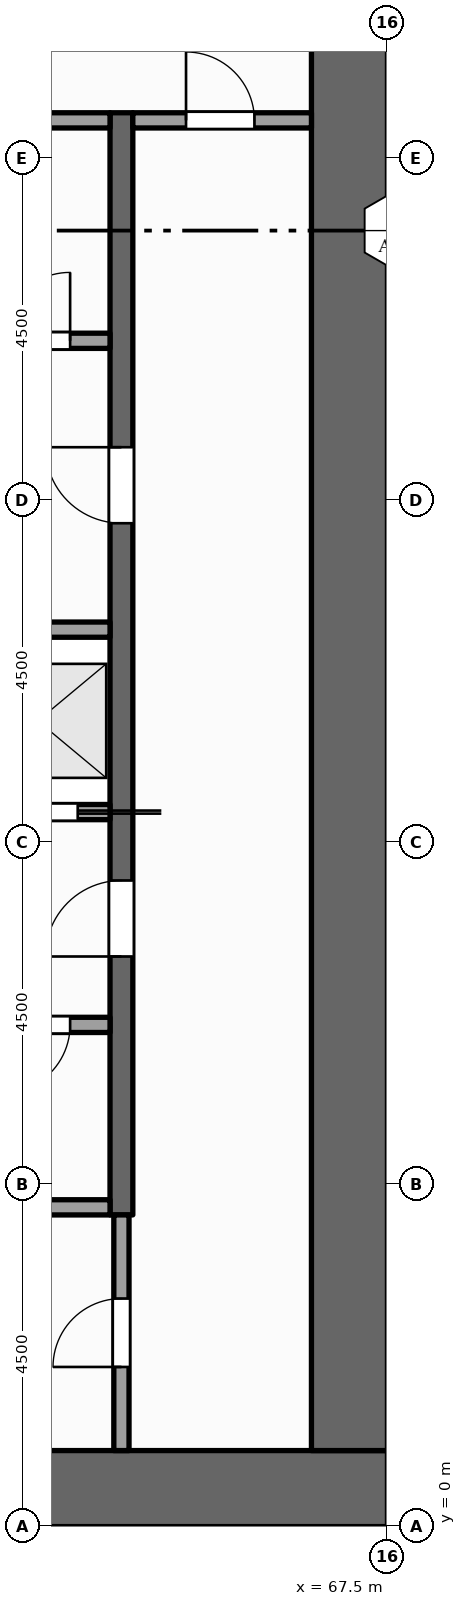
"""IFC4 building model, lengths in metres.
Left out: names, types, materials, properties, quantities, classifications, styles, units other than length and angle.
Written with IfcOpenShell. Run it as: python <this file> out.ifc"""

import sys

from ifc_helpers import new_model, si_unit, direction, frame, frame_2d, origin, place, context, subcontext, project, spatial, rectangle, extrude, element, fill, save


model = new_model("IFC4")
c1 = context("Model", 3, precision=1e-05, world=origin(), true_north=direction((0.0, 1.0)))
c2 = subcontext(c1, "Body", "Model", "MODEL_VIEW")
j1 = project(units=[si_unit("LENGTHUNIT", "METRE"), si_unit("PLANEANGLEUNIT", "RADIAN")], contexts=[c1])
p1 = place(None, origin())
s1 = spatial("IfcSite", under=j1, at=p1, CompositionType="ELEMENT")
p2 = place(p1, origin())
s2 = spatial("IfcBuilding", under=s1, at=p2, CompositionType="ELEMENT")
p3 = place(p2, frame((0.0, 0.0, 215.0)))
s3 = spatial("IfcBuildingStorey", under=s2, at=p3, CompositionType="ELEMENT", Elevation=215.0)
p4 = place(p3, frame((67.5, 0.5, -0.15), z_axis=(0.0, 0.0, 1.0), x_axis=(-1.0, 0.0, 0.0)))
e1 = element("IfcWall", 1, at=p4, inside=s3, PredefinedType="SHEAR", context=c2, shape_type="SweptSolid", body=[
    extrude(rectangle(XDim=13.5, YDim=1.0, at=frame_2d((6.75, 0.0))), origin(), (0.0, 0.0, 1.0), 4.0),
])
p5 = place(p3, frame((67.0, 1.0, -0.15), z_axis=(0.0, 0.0, 1.0), x_axis=(0.0, 1.0, 0.0)))
e2 = element("IfcWall", 2, at=p5, inside=s3, PredefinedType="SHEAR", context=c2, shape_type="SweptSolid", body=[
    extrude(rectangle(XDim=20.5, YDim=1.0, at=frame_2d((10.25, 0.0))), origin(), (0.0, 0.0, 1.0), 4.0),
])
p6 = place(p3, frame((64.0, 1.0, 0.0), z_axis=(0.0, 0.0, 1.0), x_axis=(0.0, 1.0, 0.0)))
e3 = element("IfcWall", 3, at=p6, inside=s3, PredefinedType="PARTITIONING", context=c2, shape_type="SweptSolid", body=[
    extrude(rectangle(XDim=3.1, YDim=0.2, at=frame_2d((1.55, 0.0))), origin(), (0.0, 0.0, 1.0), 3.85),
])
p7 = place(p6, frame((1.1, 0.0, 0.0)))
e4 = element("IfcOpeningElement", 4, at=p7, cuts=e3, PredefinedType="OPENING", context=c2, shape_type="SweptSolid", body=[
    extrude(rectangle(XDim=0.9, YDim=2.1, at=frame_2d((0.45, 1.05))), frame((0.0, 0.11, 0.0), z_axis=(0.0, -1.0, 0.0), x_axis=(1.0, 0.0, 0.0)), (0.0, 0.0, 1.0), 0.22),
])
p8 = place(p3, frame((64.0, 4.1, 0.0), z_axis=(0.0, 0.0, 1.0), x_axis=(0.0, 1.0, 0.0)))
e5 = element("IfcWall", 5, at=p8, inside=s3, PredefinedType="SHEAR", context=c2, shape_type="SweptSolid", body=[
    extrude(rectangle(XDim=14.5, YDim=0.3, at=frame_2d((7.25, 0.0))), origin(), (0.0, 0.0, 1.0), 3.85),
])
p9 = place(p8, frame((3.4, 0.0, 0.0)))
e6 = element("IfcOpeningElement", 6, at=p9, cuts=e5, PredefinedType="OPENING", context=c2, shape_type="SweptSolid", body=[
    extrude(rectangle(XDim=1.0, YDim=2.1, at=frame_2d((0.5, 1.05))), frame((0.0, 0.16, 0.0), z_axis=(0.0, -1.0, 0.0), x_axis=(1.0, 0.0, 0.0)), (0.0, 0.0, 1.0), 0.32),
])
p10 = place(p8, frame((9.1, 0.0, 0.0)))
e7 = element("IfcOpeningElement", 7, at=p10, cuts=e5, PredefinedType="OPENING", context=c2, shape_type="SweptSolid", body=[
    extrude(rectangle(XDim=1.0, YDim=2.1, at=frame_2d((0.5, 1.05))), frame((0.0, 0.16, 0.0), z_axis=(0.0, -1.0, 0.0), x_axis=(1.0, 0.0, 0.0)), (0.0, 0.0, 1.0), 0.32),
])
p11 = place(p3, frame((61.9, 4.2, 0.0), z_axis=(0.0, 0.0, 1.0), x_axis=(1.0, 0.0, 0.0)))
e8 = element("IfcWall", 8, at=p11, inside=s3, PredefinedType="PARTITIONING", context=c2, shape_type="SweptSolid", body=[
    extrude(rectangle(XDim=1.95, YDim=0.2, at=frame_2d((0.975, 0.0))), origin(), (0.0, 0.0, 1.0), 3.85),
])
p12 = place(p3, frame((61.9, 6.6, 0.0), z_axis=(0.0, 0.0, 1.0), x_axis=(1.0, 0.0, 0.0)))
e9 = element("IfcWall", 9, at=p12, inside=s3, PredefinedType="PARTITIONING", context=c2, shape_type="SweptSolid", body=[
    extrude(rectangle(XDim=1.95, YDim=0.2, at=frame_2d((0.975, 0.0))), origin(), (0.0, 0.0, 1.0), 3.85),
])
p13 = place(p12, frame((0.525, 0.0, 0.0)))
e10 = element("IfcOpeningElement", 10, at=p13, cuts=e9, PredefinedType="OPENING", context=c2, shape_type="SweptSolid", body=[
    extrude(rectangle(XDim=0.9, YDim=2.1, at=frame_2d((0.45, 1.05))), frame((0.0, 0.11, 0.0), z_axis=(0.0, -1.0, 0.0), x_axis=(1.0, 0.0, 0.0)), (0.0, 0.0, 1.0), 0.22),
])
p14 = place(p3, frame((61.9, 9.4, 0.0), z_axis=(0.0, 0.0, 1.0), x_axis=(1.0, 0.0, 0.0)))
e11 = element("IfcWall", 11, at=p14, inside=s3, PredefinedType="SOLIDWALL", context=c2, shape_type="SweptSolid", body=[
    extrude(rectangle(XDim=1.95, YDim=0.2, at=frame_2d((0.975, 0.0))), origin(), (0.0, 0.0, 1.0), 3.85),
])
p15 = place(p14, frame((0.425, 0.0, 0.012)))
e12 = element("IfcOpeningElement", 12, at=p15, cuts=e11, PredefinedType="OPENING", context=c2, shape_type="SweptSolid", body=[
    extrude(rectangle(XDim=1.1, YDim=2.1, at=frame_2d((0.55, 1.05))), frame((0.0, 0.11, 0.0), z_axis=(0.0, -1.0, 0.0), x_axis=(1.0, 0.0, 0.0)), (0.0, 0.0, 1.0), 0.22),
])
p16 = place(p3, frame((61.9, 11.8, 0.0), z_axis=(0.0, 0.0, 1.0), x_axis=(1.0, 0.0, 0.0)))
e13 = element("IfcWall", 13, at=p16, inside=s3, PredefinedType="SOLIDWALL", context=c2, shape_type="SweptSolid", body=[
    extrude(rectangle(XDim=1.95, YDim=0.2, at=frame_2d((0.975, 0.0))), origin(), (0.0, 0.0, 1.0), 3.85),
])
p17 = place(p3, frame((61.9, 15.6, 0.0), z_axis=(0.0, 0.0, 1.0), x_axis=(1.0, 0.0, 0.0)))
e14 = element("IfcWall", 14, at=p17, inside=s3, PredefinedType="PARTITIONING", context=c2, shape_type="SweptSolid", body=[
    extrude(rectangle(XDim=1.95, YDim=0.2, at=frame_2d((0.975, 0.0))), origin(), (0.0, 0.0, 1.0), 3.85),
])
p18 = place(p17, frame((0.525, 0.0, 0.0)))
e15 = element("IfcOpeningElement", 15, at=p18, cuts=e14, PredefinedType="OPENING", context=c2, shape_type="SweptSolid", body=[
    extrude(rectangle(XDim=0.9, YDim=2.1, at=frame_2d((0.45, 1.05))), frame((0.0, 0.11, 0.0), z_axis=(0.0, -1.0, 0.0), x_axis=(1.0, 0.0, 0.0)), (0.0, 0.0, 1.0), 0.22),
])
p19 = place(p3, frame((61.9, 18.5, 0.0), z_axis=(0.0, 0.0, 1.0), x_axis=(1.0, 0.0, 0.0)))
e16 = element("IfcWall", 16, at=p19, inside=s3, PredefinedType="PARTITIONING", context=c2, shape_type="SweptSolid", body=[
    extrude(rectangle(XDim=1.95, YDim=0.2, at=frame_2d((0.975, 0.0))), origin(), (0.0, 0.0, 1.0), 3.85),
])
p20 = place(p3, frame((64.15, 18.5, 0.0), z_axis=(0.0, 0.0, 1.0), x_axis=(1.0, 0.0, 0.0)))
e17 = element("IfcWall", 17, at=p20, inside=s3, PredefinedType="PARTITIONING", context=c2, shape_type="SweptSolid", body=[
    extrude(rectangle(XDim=2.35, YDim=0.2, at=frame_2d((1.175, 0.0))), origin(), (0.0, 0.0, 1.0), 3.85),
])
p21 = place(p20, frame((0.7, 0.0, 0.0)))
e18 = element("IfcOpeningElement", 18, at=p21, cuts=e17, PredefinedType="OPENING", context=c2, shape_type="SweptSolid", body=[
    extrude(rectangle(XDim=0.9, YDim=2.1, at=frame_2d((0.45, 1.05))), frame((0.0, 0.11, 0.0), z_axis=(0.0, -1.0, 0.0), x_axis=(1.0, 0.0, 0.0)), (0.0, 0.0, 1.0), 0.22),
])
p22 = place(p15, origin())
e19 = element("IfcDoor", 19, at=p22, inside=s3, OperationType="SLIDING_TO_RIGHT", PredefinedType="DOOR", context=c2, shape_type="SweptSolid", body=[
    extrude(rectangle(XDim=1.1, YDim=2.1, at=frame_2d((0.55, 1.05))), frame((0.0, 0.025, 0.0), z_axis=(0.0, -1.0, 0.0), x_axis=(1.0, 0.0, 0.0)), (0.0, 0.0, 1.0), 0.05),
])
fill(e12, e19)
p23 = place(p9, origin())
e20 = element("IfcDoor", 20, at=p23, inside=s3, OperationType="SINGLE_SWING_LEFT", PredefinedType="DOOR", context=c2, shape_type="SweptSolid", body=[
    extrude(rectangle(XDim=1.0, YDim=2.1, at=frame_2d((0.5, 1.05))), frame((0.0, 0.025, 0.0), z_axis=(0.0, -1.0, 0.0), x_axis=(1.0, 0.0, 0.0)), (0.0, 0.0, 1.0), 0.05),
])
fill(e6, e20)
p24 = place(p10, origin())
e21 = element("IfcDoor", 21, at=p24, inside=s3, OperationType="SINGLE_SWING_RIGHT", PredefinedType="DOOR", context=c2, shape_type="SweptSolid", body=[
    extrude(rectangle(XDim=1.0, YDim=2.1, at=frame_2d((0.5, 1.05))), frame((0.0, 0.025, 0.0), z_axis=(0.0, -1.0, 0.0), x_axis=(1.0, 0.0, 0.0)), (0.0, 0.0, 1.0), 0.05),
])
fill(e7, e21)
p25 = place(p7, origin())
e22 = element("IfcDoor", 22, at=p25, inside=s3, OperationType="SINGLE_SWING_LEFT", PredefinedType="DOOR", context=c2, shape_type="SweptSolid", body=[
    extrude(rectangle(XDim=0.9, YDim=2.1, at=frame_2d((0.45, 1.05))), frame((0.0, 0.025, 0.0), z_axis=(0.0, -1.0, 0.0), x_axis=(1.0, 0.0, 0.0)), (0.0, 0.0, 1.0), 0.05),
])
fill(e4, e22)
p26 = place(p21, origin())
e23 = element("IfcDoor", 23, at=p26, inside=s3, OperationType="SINGLE_SWING_LEFT", PredefinedType="DOOR", context=c2, shape_type="SweptSolid", body=[
    extrude(rectangle(XDim=0.9, YDim=2.1, at=frame_2d((0.45, 1.05))), frame((0.0, 0.025, 0.0), z_axis=(0.0, -1.0, 0.0), x_axis=(1.0, 0.0, 0.0)), (0.0, 0.0, 1.0), 0.05),
])
fill(e18, e23)
p27 = place(p13, origin())
e24 = element("IfcDoor", 24, at=p27, inside=s3, OperationType="SINGLE_SWING_LEFT", PredefinedType="DOOR", context=c2, shape_type="SweptSolid", body=[
    extrude(rectangle(XDim=0.9, YDim=2.1, at=frame_2d((0.45, 1.05))), frame((0.0, 0.025, 0.0), z_axis=(0.0, -1.0, 0.0), x_axis=(1.0, 0.0, 0.0)), (0.0, 0.0, 1.0), 0.05),
])
fill(e10, e24)
p28 = place(p18, origin())
e25 = element("IfcDoor", 25, at=p28, inside=s3, OperationType="SINGLE_SWING_RIGHT", PredefinedType="DOOR", context=c2, shape_type="SweptSolid", body=[
    extrude(rectangle(XDim=0.9, YDim=2.1, at=frame_2d((0.45, 1.05))), frame((0.0, 0.025, 0.0), z_axis=(0.0, -1.0, 0.0), x_axis=(1.0, 0.0, 0.0)), (0.0, 0.0, 1.0), 0.05),
])
fill(e15, e25)
save(model, sys.argv[1])
